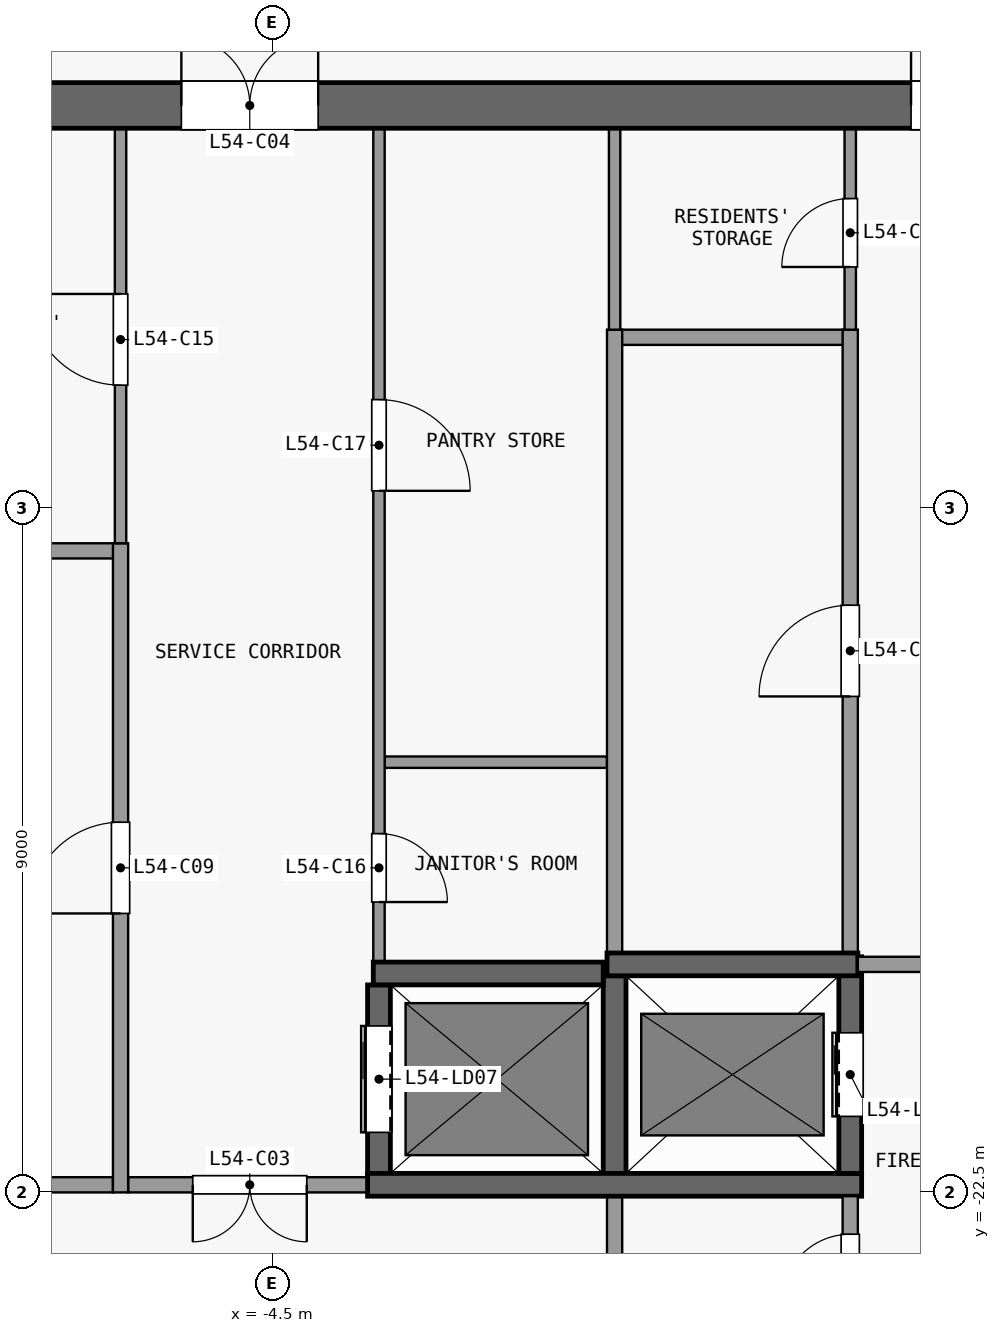
"""IFC4 building model, lengths in metres.
Left out: names, types, materials, properties, quantities, classifications, styles, units other than length and angle.
Written with IfcOpenShell. Run it as: python <this file> out.ifc"""

import sys

from ifc_helpers import new_model, si_unit, direction, frame, frame_2d, origin, place, context, subcontext, project, spatial, rectangle, extrude, element, fill, save


model = new_model("IFC4")
c1 = context("Model", 3, precision=1e-05, world=origin(), true_north=direction((0.0, 1.0)))
c2 = subcontext(c1, "Body", "Model", "MODEL_VIEW")
j1 = project(units=[si_unit("LENGTHUNIT", "METRE"), si_unit("PLANEANGLEUNIT", "RADIAN")], contexts=[c1])
p1 = place(None, origin())
s1 = spatial("IfcSite", under=j1, at=p1, CompositionType="ELEMENT")
p2 = place(p1, origin())
s2 = spatial("IfcBuilding", under=s1, at=p2, CompositionType="ELEMENT")
p3 = place(p2, frame((0.0, 0.0, 215.9)))
s3 = spatial("IfcBuildingStorey", under=s2, at=p3, CompositionType="ELEMENT", Elevation=215.9)
p4 = place(p3, frame((-13.2, -8.2, 0.0), z_axis=(0.0, 0.0, 1.0), x_axis=(1.0, 0.0, 0.0)))
e1 = element("IfcWall", 1, at=p4, inside=s3, PredefinedType="SHEAR", context=c2, shape_type="SweptSolid", body=[
    extrude(rectangle(XDim=26.4, YDim=0.6, at=frame_2d((13.2, 0.0))), origin(), (0.0, 0.0, 1.0), 3.3),
])
p5 = place(p4, frame((7.5, 0.0, 0.0)))
e2 = element("IfcOpeningElement", 2, at=p5, cuts=e1, PredefinedType="OPENING", context=c2, shape_type="SweptSolid", body=[
    extrude(rectangle(XDim=1.8, YDim=2.1, at=frame_2d((0.9, 1.05))), frame((0.0, 0.31, 0.0), z_axis=(0.0, -1.0, 0.0), x_axis=(1.0, 0.0, 0.0)), (0.0, 0.0, 1.0), 0.62),
])
p6 = place(p4, frame((17.1, 0.0, 0.0)))
e3 = element("IfcOpeningElement", 3, at=p6, cuts=e1, PredefinedType="OPENING", context=c2, shape_type="SweptSolid", body=[
    extrude(rectangle(XDim=1.8, YDim=2.1, at=frame_2d((0.9, 1.05))), frame((0.0, 0.31, 0.0), z_axis=(0.0, -1.0, 0.0), x_axis=(1.0, 0.0, 0.0)), (0.0, 0.0, 1.0), 0.62),
])
p7 = place(p4, frame((2.425, 0.0, 0.0)))
e4 = element("IfcOpeningElement", 4, at=p7, cuts=e1, PredefinedType="OPENING", context=c2, shape_type="SweptSolid", body=[
    extrude(rectangle(XDim=0.9, YDim=2.1, at=frame_2d((0.45, 1.05))), frame((0.0, 0.31, 0.0), z_axis=(0.0, -1.0, 0.0), x_axis=(1.0, 0.0, 0.0)), (0.0, 0.0, 1.0), 0.62),
])
p8 = place(p4, frame((23.075, 0.0, 0.0)))
e5 = element("IfcOpeningElement", 5, at=p8, cuts=e1, PredefinedType="OPENING", context=c2, shape_type="SweptSolid", body=[
    extrude(rectangle(XDim=0.9, YDim=2.1, at=frame_2d((0.45, 1.05))), frame((0.0, 0.31, 0.0), z_axis=(0.0, -1.0, 0.0), x_axis=(1.0, 0.0, 0.0)), (0.0, 0.0, 1.0), 0.62),
])
p9 = place(p3, frame((-9.45, -22.4, 0.0), z_axis=(0.0, 0.0, 1.0), x_axis=(1.0, 0.0, 0.0)))
e6 = element("IfcWall", 6, at=p9, inside=s3, PredefinedType="PARTITIONING", context=c2, shape_type="SweptSolid", body=[
    extrude(rectangle(XDim=2.85, YDim=0.2, at=frame_2d((1.425, 0.0))), origin(), (0.0, 0.0, 1.0), 3.3),
])
p10 = place(p3, frame((-3.25, -22.4, 0.0), z_axis=(0.0, 0.0, 1.0), x_axis=(-1.0, 0.0, 0.0)))
e7 = element("IfcWall", 7, at=p10, inside=s3, PredefinedType="PARTITIONING", context=c2, shape_type="SweptSolid", body=[
    extrude(rectangle(XDim=3.15, YDim=0.2, at=frame_2d((1.575, 0.0))), origin(), (0.0, 0.0, 1.0), 3.3),
])
p11 = place(p10, frame((0.8, 0.0, 0.0)))
e8 = element("IfcOpeningElement", 8, at=p11, cuts=e7, PredefinedType="OPENING", context=c2, shape_type="SweptSolid", body=[
    extrude(rectangle(XDim=1.5, YDim=2.1, at=frame_2d((0.75, 1.05))), frame((0.0, 0.11, 0.0), z_axis=(0.0, -1.0, 0.0), x_axis=(1.0, 0.0, 0.0)), (0.0, 0.0, 1.0), 0.22),
])
p12 = place(p3, frame((-3.25, -22.4, 0.0), z_axis=(0.0, 0.0, 1.0), x_axis=(1.0, 0.0, 0.0)))
e9 = element("IfcWall", 9, at=p12, inside=s3, PredefinedType="SHEAR", context=c2, shape_type="SweptSolid", body=[
    extrude(rectangle(XDim=6.5, YDim=0.3, at=frame_2d((3.25, 0.0))), origin(), (0.0, 0.0, 1.0), 3.3),
])
p13 = place(p3, frame((-3.175, -19.62, 0.0), z_axis=(0.0, 0.0, 1.0), x_axis=(1.0, 0.0, 0.0)))
e10 = element("IfcWall", 10, at=p13, inside=s3, PredefinedType="SHEAR", context=c2, shape_type="SweptSolid", body=[
    extrude(rectangle(XDim=3.025, YDim=0.3, at=frame_2d((1.513, 0.0))), origin(), (0.0, 0.0, 1.0), 3.3),
])
p14 = place(p3, frame((-0.1, -19.5, 0.0), z_axis=(0.0, 0.0, 1.0), x_axis=(1.0, 0.0, 0.0)))
e11 = element("IfcWall", 11, at=p14, inside=s3, PredefinedType="SHEAR", context=c2, shape_type="SweptSolid", body=[
    extrude(rectangle(XDim=3.3, YDim=0.3, at=frame_2d((1.65, 0.0))), origin(), (0.0, 0.0, 1.0), 3.3),
])
p15 = place(p3, frame((6.35, -19.5, 0.0), z_axis=(0.0, 0.0, 1.0), x_axis=(-1.0, 0.0, 0.0)))
e12 = element("IfcWall", 12, at=p15, inside=s3, PredefinedType="PARTITIONING", context=c2, shape_type="SweptSolid", body=[
    extrude(rectangle(XDim=3.15, YDim=0.2, at=frame_2d((1.575, 0.0))), origin(), (0.0, 0.0, 1.0), 3.3),
])
p16 = place(p15, frame((0.8, 0.0, 0.0)))
e13 = element("IfcOpeningElement", 13, at=p16, cuts=e12, PredefinedType="OPENING", context=c2, shape_type="SweptSolid", body=[
    extrude(rectangle(XDim=1.5, YDim=2.1, at=frame_2d((0.75, 1.05))), frame((0.0, 0.11, 0.0), z_axis=(0.0, -1.0, 0.0), x_axis=(1.0, 0.0, 0.0)), (0.0, 0.0, 1.0), 0.22),
])
p17 = place(p3, frame((-3.025, -16.84, 0.0), z_axis=(0.0, 0.0, 1.0), x_axis=(1.0, 0.0, 0.0)))
e14 = element("IfcWall", 14, at=p17, inside=s3, PredefinedType="PARTITIONING", context=c2, shape_type="SweptSolid", body=[
    extrude(rectangle(XDim=2.925, YDim=0.15, at=frame_2d((1.462, 0.0))), origin(), (0.0, 0.0, 1.0), 3.3),
])
p18 = place(p3, frame((-9.5, -14.06, 0.0), z_axis=(0.0, 0.0, 1.0), x_axis=(1.0, 0.0, 0.0)))
e15 = element("IfcWall", 15, at=p18, inside=s3, PredefinedType="PARTITIONING", context=c2, shape_type="SweptSolid", body=[
    extrude(rectangle(XDim=3.075, YDim=0.2, at=frame_2d((1.538, 0.0))), origin(), (0.0, 0.0, 1.0), 3.3),
])
p19 = place(p3, frame((-0.075, -11.25, 0.0), z_axis=(0.0, 0.0, 1.0), x_axis=(1.0, 0.0, 0.0)))
e16 = element("IfcWall", 16, at=p19, inside=s3, PredefinedType="PARTITIONING", context=c2, shape_type="SweptSolid", body=[
    extrude(rectangle(XDim=3.25, YDim=0.2, at=frame_2d((1.625, 0.0))), origin(), (0.0, 0.0, 1.0), 3.3),
])
p20 = place(p3, frame((-6.5, -22.5, 0.0), z_axis=(0.0, 0.0, 1.0), x_axis=(0.0, 1.0, 0.0)))
e17 = element("IfcWall", 17, at=p20, inside=s3, PredefinedType="PARTITIONING", context=c2, shape_type="SweptSolid", body=[
    extrude(rectangle(XDim=8.54, YDim=0.2, at=frame_2d((4.27, 0.0))), origin(), (0.0, 0.0, 1.0), 3.3),
])
p21 = place(p20, frame((3.67, 0.0, 0.0)))
e18 = element("IfcOpeningElement", 18, at=p21, cuts=e17, PredefinedType="OPENING", context=c2, shape_type="SweptSolid", body=[
    extrude(rectangle(XDim=1.2, YDim=2.1, at=frame_2d((0.6, 1.05))), frame((0.0, 0.11, 0.0), z_axis=(0.0, -1.0, 0.0), x_axis=(1.0, 0.0, 0.0)), (0.0, 0.0, 1.0), 0.22),
])
p22 = place(p3, frame((-6.5, -13.96, 0.0), z_axis=(0.0, 0.0, 1.0), x_axis=(0.0, 1.0, 0.0)))
e19 = element("IfcWall", 19, at=p22, inside=s3, PredefinedType="PARTITIONING", context=c2, shape_type="SweptSolid", body=[
    extrude(rectangle(XDim=5.46, YDim=0.15, at=frame_2d((2.73, 0.0))), origin(), (0.0, 0.0, 1.0), 3.3),
])
p23 = place(p22, frame((2.08, 0.0, 0.0)))
e20 = element("IfcOpeningElement", 20, at=p23, cuts=e19, PredefinedType="OPENING", context=c2, shape_type="SweptSolid", body=[
    extrude(rectangle(XDim=1.2, YDim=2.1, at=frame_2d((0.6, 1.05))), frame((0.0, 0.085, 0.0), z_axis=(0.0, -1.0, 0.0), x_axis=(1.0, 0.0, 0.0)), (0.0, 0.0, 1.0), 0.17),
])
p24 = place(p3, frame((-3.1, -22.25, 0.0), z_axis=(0.0, 0.0, 1.0), x_axis=(0.0, 1.0, 0.0)))
e21 = element("IfcWall", 21, at=p24, inside=s3, PredefinedType="SHEAR", context=c2, shape_type="SweptSolid", body=[
    extrude(rectangle(XDim=2.48, YDim=0.3, at=frame_2d((1.24, 0.0))), origin(), (0.0, 0.0, 1.0), 3.3),
])
p25 = place(p24, frame((0.54, 0.0, 0.0)))
e22 = element("IfcOpeningElement", 22, at=p25, cuts=e21, PredefinedType="OPENING", context=c2, shape_type="SweptSolid", body=[
    extrude(rectangle(XDim=1.4, YDim=2.1, at=frame_2d((0.7, 1.05))), frame((0.0, 0.16, 0.0), z_axis=(0.0, -1.0, 0.0), x_axis=(1.0, 0.0, 0.0)), (0.0, 0.0, 1.0), 0.32),
])
p26 = place(p3, frame((-3.1, -8.5, 0.0), z_axis=(0.0, 0.0, 1.0), x_axis=(0.0, -1.0, 0.0)))
e23 = element("IfcWall", 23, at=p26, inside=s3, PredefinedType="PARTITIONING", context=c2, shape_type="SweptSolid", body=[
    extrude(rectangle(XDim=10.97, YDim=0.15, at=frame_2d((5.485, 0.0))), origin(), (0.0, 0.0, 1.0), 3.3),
])
p27 = place(p26, frame((9.28, 0.0, 0.0)))
e24 = element("IfcOpeningElement", 24, at=p27, cuts=e23, PredefinedType="OPENING", context=c2, shape_type="SweptSolid", body=[
    extrude(rectangle(XDim=0.9, YDim=2.1, at=frame_2d((0.45, 1.05))), frame((0.0, 0.085, 0.0), z_axis=(0.0, -1.0, 0.0), x_axis=(1.0, 0.0, 0.0)), (0.0, 0.0, 1.0), 0.17),
])
p28 = place(p26, frame((3.57, 0.0, 0.0)))
e25 = element("IfcOpeningElement", 25, at=p28, cuts=e23, PredefinedType="OPENING", context=c2, shape_type="SweptSolid", body=[
    extrude(rectangle(XDim=1.2, YDim=2.1, at=frame_2d((0.6, 1.05))), frame((0.0, 0.085, 0.0), z_axis=(0.0, -1.0, 0.0), x_axis=(1.0, 0.0, 0.0)), (0.0, 0.0, 1.0), 0.17),
])
p29 = place(p3, frame((0.0, -24.6, 0.0), z_axis=(0.0, 0.0, 1.0), x_axis=(0.0, 1.0, 0.0)))
e26 = element("IfcWall", 26, at=p29, inside=s3, PredefinedType="PARTITIONING", context=c2, shape_type="SweptSolid", body=[
    extrude(rectangle(XDim=2.05, YDim=0.2, at=frame_2d((1.025, 0.0))), origin(), (0.0, 0.0, 1.0), 3.3),
])
p30 = place(p3, frame((0.0, -22.25, 0.0), z_axis=(0.0, 0.0, 1.0), x_axis=(0.0, 1.0, 0.0)))
e27 = element("IfcWall", 27, at=p30, inside=s3, PredefinedType="SHEAR", context=c2, shape_type="SweptSolid", body=[
    extrude(rectangle(XDim=2.6, YDim=0.3, at=frame_2d((1.3, 0.0))), origin(), (0.0, 0.0, 1.0), 3.3),
])
p31 = place(p3, frame((0.0, -19.35, 0.0), z_axis=(0.0, 0.0, 1.0), x_axis=(0.0, 1.0, 0.0)))
e28 = element("IfcWall", 28, at=p31, inside=s3, PredefinedType="PARTITIONING", context=c2, shape_type="SweptSolid", body=[
    extrude(rectangle(XDim=8.2, YDim=0.2, at=frame_2d((4.1, 0.0))), origin(), (0.0, 0.0, 1.0), 3.3),
])
p32 = place(p3, frame((0.0, -11.15, 0.0), z_axis=(0.0, 0.0, 1.0), x_axis=(0.0, 1.0, 0.0)))
e29 = element("IfcWall", 29, at=p32, inside=s3, PredefinedType="PARTITIONING", context=c2, shape_type="SweptSolid", body=[
    extrude(rectangle(XDim=2.65, YDim=0.15, at=frame_2d((1.325, 0.0))), origin(), (0.0, 0.0, 1.0), 3.3),
])
p33 = place(p3, frame((3.1, -24.6, 0.0), z_axis=(0.0, 0.0, 1.0), x_axis=(0.0, 1.0, 0.0)))
e30 = element("IfcWall", 30, at=p33, inside=s3, PredefinedType="PARTITIONING", context=c2, shape_type="SweptSolid", body=[
    extrude(rectangle(XDim=2.05, YDim=0.2, at=frame_2d((1.025, 0.0))), origin(), (0.0, 0.0, 1.0), 3.3),
])
p34 = place(p33, frame((0.65, 0.0, 0.0)))
e31 = element("IfcOpeningElement", 31, at=p34, cuts=e30, PredefinedType="OPENING", context=c2, shape_type="SweptSolid", body=[
    extrude(rectangle(XDim=0.9, YDim=2.1, at=frame_2d((0.45, 1.05))), frame((0.0, 0.11, 0.0), z_axis=(0.0, -1.0, 0.0), x_axis=(1.0, 0.0, 0.0)), (0.0, 0.0, 1.0), 0.22),
])
p35 = place(p3, frame((3.1, -22.25, 0.0), z_axis=(0.0, 0.0, 1.0), x_axis=(0.0, 1.0, 0.0)))
e32 = element("IfcWall", 32, at=p35, inside=s3, PredefinedType="SHEAR", context=c2, shape_type="SweptSolid", body=[
    extrude(rectangle(XDim=2.85, YDim=0.3, at=frame_2d((1.425, 0.0))), origin(), (0.0, 0.0, 1.0), 3.3),
])
p36 = place(p35, frame((0.75, 0.0, 0.0)))
e33 = element("IfcOpeningElement", 33, at=p36, cuts=e32, PredefinedType="OPENING", context=c2, shape_type="SweptSolid", body=[
    extrude(rectangle(XDim=1.1, YDim=2.1, at=frame_2d((0.55, 1.05))), frame((0.0, 0.16, 0.0), z_axis=(0.0, -1.0, 0.0), x_axis=(1.0, 0.0, 0.0)), (0.0, 0.0, 1.0), 0.32),
])
p37 = place(p3, frame((3.1, -19.6, 0.0), z_axis=(0.0, 0.0, 1.0), x_axis=(0.0, 1.0, 0.0)))
e34 = element("IfcWall", 34, at=p37, inside=s3, PredefinedType="PARTITIONING", context=c2, shape_type="SweptSolid", body=[
    extrude(rectangle(XDim=8.45, YDim=0.2, at=frame_2d((4.225, 0.0))), origin(), (0.0, 0.0, 1.0), 3.3),
])
p38 = place(p37, frame((3.625, 0.0, 0.0)))
e35 = element("IfcOpeningElement", 35, at=p38, cuts=e34, PredefinedType="OPENING", context=c2, shape_type="SweptSolid", body=[
    extrude(rectangle(XDim=1.2, YDim=2.1, at=frame_2d((0.6, 1.05))), frame((0.0, 0.11, 0.0), z_axis=(0.0, -1.0, 0.0), x_axis=(1.0, 0.0, 0.0)), (0.0, 0.0, 1.0), 0.22),
])
p39 = place(p3, frame((3.1, -11.15, 0.0), z_axis=(0.0, 0.0, 1.0), x_axis=(0.0, 1.0, 0.0)))
e36 = element("IfcWall", 36, at=p39, inside=s3, PredefinedType="PARTITIONING", context=c2, shape_type="SweptSolid", body=[
    extrude(rectangle(XDim=2.65, YDim=0.15, at=frame_2d((1.325, 0.0))), origin(), (0.0, 0.0, 1.0), 3.3),
])
p40 = place(p39, frame((0.825, 0.0, 0.0)))
e37 = element("IfcOpeningElement", 37, at=p40, cuts=e36, PredefinedType="OPENING", context=c2, shape_type="SweptSolid", body=[
    extrude(rectangle(XDim=0.9, YDim=2.1, at=frame_2d((0.45, 1.05))), frame((0.0, 0.085, 0.0), z_axis=(0.0, -1.0, 0.0), x_axis=(1.0, 0.0, 0.0)), (0.0, 0.0, 1.0), 0.17),
])
p41 = place(p36, origin())
e38 = element("IfcDoor", 38, at=p41, inside=s3, OperationType="DOUBLE_DOOR_SLIDING", PredefinedType="DOOR", context=c2, shape_type="SweptSolid", body=[
    extrude(rectangle(XDim=1.1, YDim=2.1, at=frame_2d((0.55, 1.05))), frame((0.0, 0.025, 0.0), z_axis=(0.0, -1.0, 0.0), x_axis=(1.0, 0.0, 0.0)), (0.0, 0.0, 1.0), 0.05),
])
fill(e33, e38)
p42 = place(p25, origin())
e39 = element("IfcDoor", 39, at=p42, inside=s3, OperationType="DOUBLE_DOOR_SLIDING", PredefinedType="DOOR", context=c2, shape_type="SweptSolid", body=[
    extrude(rectangle(XDim=1.4, YDim=2.1, at=frame_2d((0.7, 1.05))), frame((0.0, 0.025, 0.0), z_axis=(0.0, -1.0, 0.0), x_axis=(1.0, 0.0, 0.0)), (0.0, 0.0, 1.0), 0.05),
])
fill(e22, e39)
p43 = place(p11, origin())
e40 = element("IfcDoor", 40, at=p43, inside=s3, OperationType="DOUBLE_DOOR_SINGLE_SWING", PredefinedType="DOOR", context=c2, shape_type="SweptSolid", body=[
    extrude(rectangle(XDim=1.5, YDim=2.1, at=frame_2d((0.75, 1.05))), frame((0.0, 0.025, 0.0), z_axis=(0.0, -1.0, 0.0), x_axis=(1.0, 0.0, 0.0)), (0.0, 0.0, 1.0), 0.05),
])
fill(e8, e40)
p44 = place(p5, origin())
e41 = element("IfcDoor", 41, at=p44, inside=s3, OperationType="DOUBLE_DOOR_SINGLE_SWING", PredefinedType="DOOR", context=c2, shape_type="SweptSolid", body=[
    extrude(rectangle(XDim=1.8, YDim=2.1, at=frame_2d((0.9, 1.05))), frame((0.0, 0.025, 0.0), z_axis=(0.0, -1.0, 0.0), x_axis=(1.0, 0.0, 0.0)), (0.0, 0.0, 1.0), 0.05),
])
fill(e2, e41)
p45 = place(p6, origin())
e42 = element("IfcDoor", 42, at=p45, inside=s3, OperationType="DOUBLE_DOOR_SINGLE_SWING", PredefinedType="DOOR", context=c2, shape_type="SweptSolid", body=[
    extrude(rectangle(XDim=1.8, YDim=2.1, at=frame_2d((0.9, 1.05))), frame((0.0, 0.025, 0.0), z_axis=(0.0, -1.0, 0.0), x_axis=(1.0, 0.0, 0.0)), (0.0, 0.0, 1.0), 0.05),
])
fill(e3, e42)
p46 = place(p34, origin())
e43 = element("IfcDoor", 43, at=p46, inside=s3, OperationType="SINGLE_SWING_LEFT", PredefinedType="DOOR", context=c2, shape_type="SweptSolid", body=[
    extrude(rectangle(XDim=0.9, YDim=2.1, at=frame_2d((0.45, 1.05))), frame((0.0, 0.025, 0.0), z_axis=(0.0, -1.0, 0.0), x_axis=(1.0, 0.0, 0.0)), (0.0, 0.0, 1.0), 0.05),
])
fill(e31, e43)
p47 = place(p21, origin())
e44 = element("IfcDoor", 44, at=p47, inside=s3, OperationType="SINGLE_SWING_LEFT", PredefinedType="DOOR", context=c2, shape_type="SweptSolid", body=[
    extrude(rectangle(XDim=1.2, YDim=2.1, at=frame_2d((0.6, 1.05))), frame((0.0, 0.025, 0.0), z_axis=(0.0, -1.0, 0.0), x_axis=(1.0, 0.0, 0.0)), (0.0, 0.0, 1.0), 0.05),
])
fill(e18, e44)
p48 = place(p38, origin())
e45 = element("IfcDoor", 45, at=p48, inside=s3, OperationType="SINGLE_SWING_LEFT", PredefinedType="DOOR", context=c2, shape_type="SweptSolid", body=[
    extrude(rectangle(XDim=1.2, YDim=2.1, at=frame_2d((0.6, 1.05))), frame((0.0, 0.025, 0.0), z_axis=(0.0, -1.0, 0.0), x_axis=(1.0, 0.0, 0.0)), (0.0, 0.0, 1.0), 0.05),
])
fill(e35, e45)
p49 = place(p23, origin())
e46 = element("IfcDoor", 46, at=p49, inside=s3, OperationType="SINGLE_SWING_RIGHT", PredefinedType="DOOR", context=c2, shape_type="SweptSolid", body=[
    extrude(rectangle(XDim=1.2, YDim=2.1, at=frame_2d((0.6, 1.05))), frame((0.0, 0.025, 0.0), z_axis=(0.0, -1.0, 0.0), x_axis=(1.0, 0.0, 0.0)), (0.0, 0.0, 1.0), 0.05),
])
fill(e20, e46)
p50 = place(p27, origin())
e47 = element("IfcDoor", 47, at=p50, inside=s3, OperationType="SINGLE_SWING_RIGHT", PredefinedType="DOOR", context=c2, shape_type="SweptSolid", body=[
    extrude(rectangle(XDim=0.9, YDim=2.1, at=frame_2d((0.45, 1.05))), frame((0.0, 0.025, 0.0), z_axis=(0.0, -1.0, 0.0), x_axis=(1.0, 0.0, 0.0)), (0.0, 0.0, 1.0), 0.05),
])
fill(e24, e47)
p51 = place(p28, origin())
e48 = element("IfcDoor", 48, at=p51, inside=s3, OperationType="SINGLE_SWING_RIGHT", PredefinedType="DOOR", context=c2, shape_type="SweptSolid", body=[
    extrude(rectangle(XDim=1.2, YDim=2.1, at=frame_2d((0.6, 1.05))), frame((0.0, 0.025, 0.0), z_axis=(0.0, -1.0, 0.0), x_axis=(1.0, 0.0, 0.0)), (0.0, 0.0, 1.0), 0.05),
])
fill(e25, e48)
p52 = place(p40, origin())
e49 = element("IfcDoor", 49, at=p52, inside=s3, OperationType="SINGLE_SWING_LEFT", PredefinedType="DOOR", context=c2, shape_type="SweptSolid", body=[
    extrude(rectangle(XDim=0.9, YDim=2.1, at=frame_2d((0.45, 1.05))), frame((0.0, 0.025, 0.0), z_axis=(0.0, -1.0, 0.0), x_axis=(1.0, 0.0, 0.0)), (0.0, 0.0, 1.0), 0.05),
])
fill(e37, e49)
save(model, sys.argv[1])
